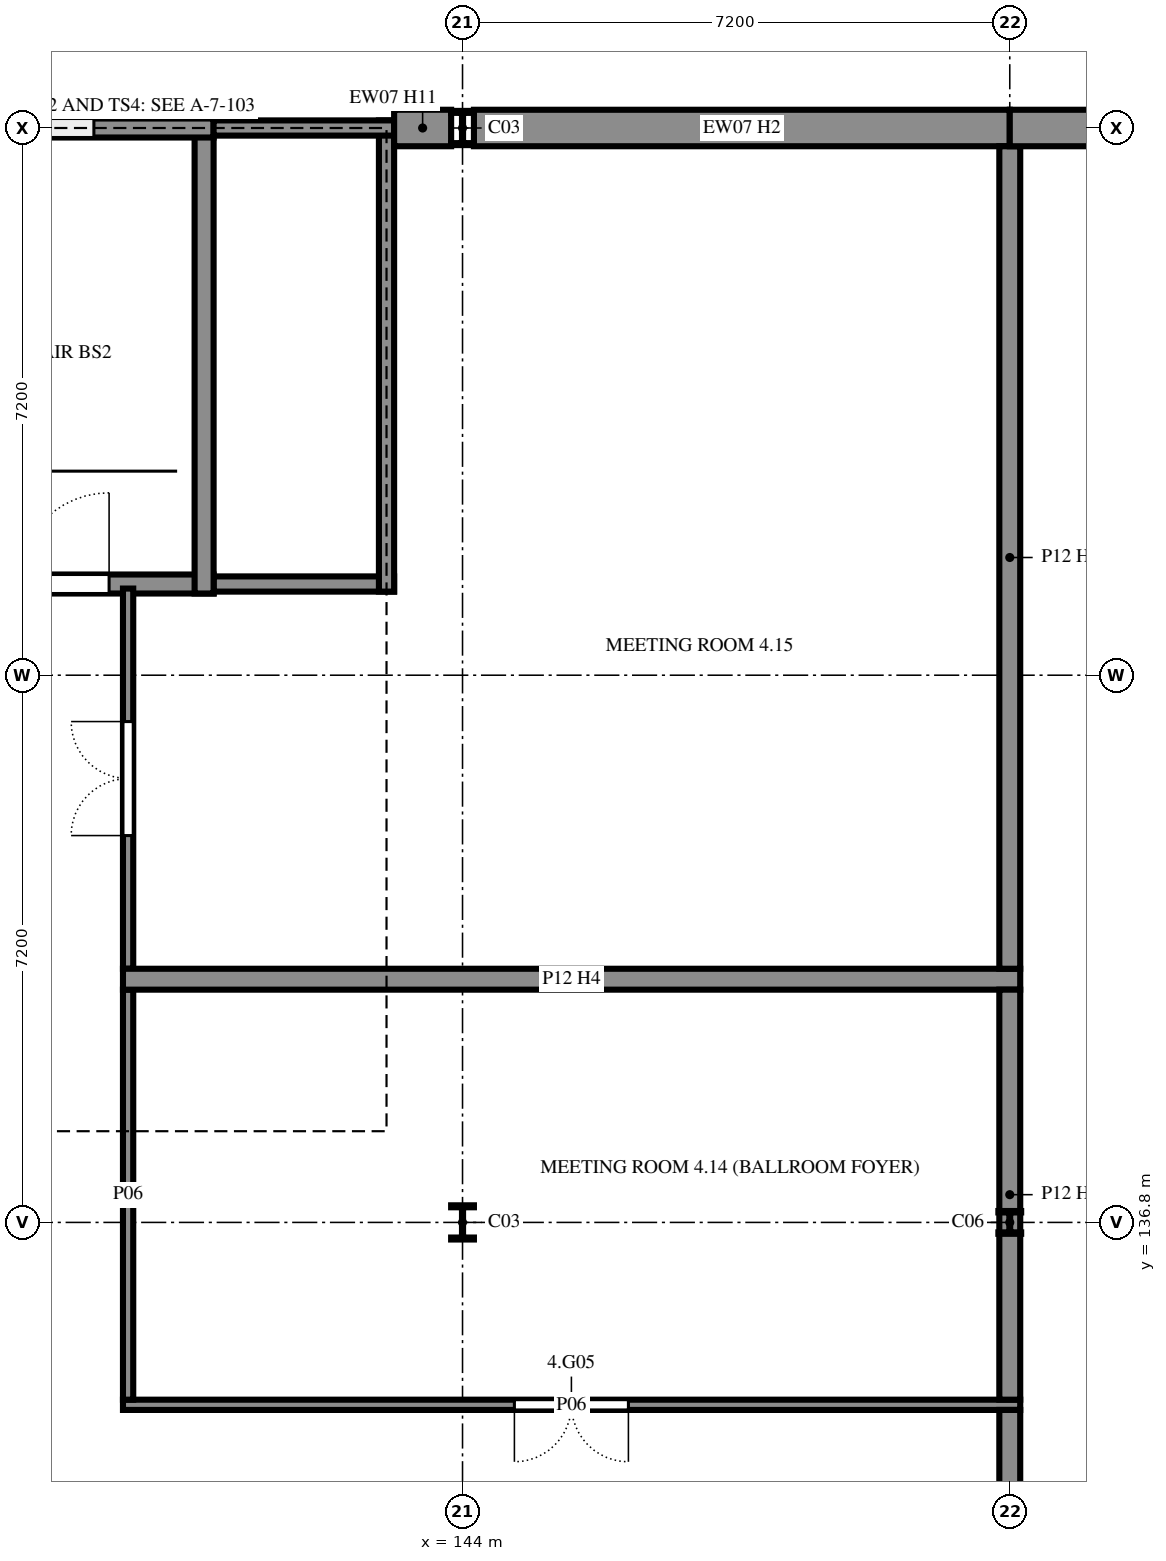
"""IFC4 building model, lengths in metres.
Left out: names, types, materials, properties, quantities, classifications, styles, units other than length and angle.
Written with IfcOpenShell. Run it as: python <this file> out.ifc"""

import sys

from ifc_helpers import new_model, si_unit, direction, frame, frame_2d, origin, origin_2d, place, context, subcontext, project, spatial, rectangle, i_section, extrude, element, fill, save


model = new_model("IFC4")
c1 = context("Model", 3, precision=1e-05, world=origin(), true_north=direction((0.0, 1.0)))
c2 = subcontext(c1, "Body", "Model", "MODEL_VIEW")
j1 = project(units=[si_unit("LENGTHUNIT", "METRE"), si_unit("PLANEANGLEUNIT", "RADIAN")], contexts=[c1])
p1 = place(None, origin())
s1 = spatial("IfcSite", under=j1, at=p1, CompositionType="ELEMENT")
p2 = place(p1, origin())
s2 = spatial("IfcBuilding", under=s1, at=p2, CompositionType="ELEMENT")
p3 = place(p2, frame((0.0, 0.0, 14.4)))
s3 = spatial("IfcBuildingStorey", under=s2, at=p3, CompositionType="ELEMENT", Elevation=14.4)
p4 = place(p3, frame((151.2, 136.8, 0.0), z_axis=(0.0, 0.0, 1.0), x_axis=(1.0, 0.0, 0.0)))
e1 = element("IfcColumn", 1, at=p4, inside=s3, PredefinedType="COLUMN", context=c2, shape_type="SweptSolid", body=[
    extrude(i_section(OverallWidth=0.3, OverallDepth=0.3, WebThickness=0.011, FlangeThickness=0.019, FilletRadius=0.027, at=origin_2d()), origin(), (0.0, 0.0, 1.0), 3.6),
])
for number, where, z_axis, x_axis in (
    (2, (144.0, 136.8, 0.0), (0.0, 0.0, 1.0), (1.0, 0.0, 0.0)),
    (3, (144.0, 151.2, 0.0), (0.0, 0.0, 1.0), (1.0, 0.0, 0.0)),
):
    element("IfcColumn", number, at=place(p3, frame(where, z_axis=z_axis, x_axis=x_axis)), inside=s3, PredefinedType="COLUMN", context=c2, shape_type="SweptSolid", body=[
        extrude(i_section(OverallWidth=0.3, OverallDepth=0.45, WebThickness=0.014, FlangeThickness=0.026, FilletRadius=0.027, at=origin_2d()), origin(), (0.0, 0.0, 1.0), 3.6),
    ])
p5 = place(p3, frame((136.675, 145.2, 0.0), z_axis=(0.0, 0.0, 1.0), x_axis=(1.0, 0.0, 0.0)))
e4 = element("IfcWall", 4, at=p5, inside=s3, PredefinedType="SHEAR", context=c2, shape_type="SweptSolid", body=[
    extrude(rectangle(XDim=4.05, YDim=0.25, at=frame_2d((2.025, 0.0))), origin(), (0.0, 0.0, 1.0), 3.6),
])
p6 = place(p5, frame((1.475, 0.0, 0.0)))
e5 = element("IfcOpeningElement", 5, at=p6, cuts=e4, PredefinedType="OPENING", context=c2, shape_type="SweptSolid", body=[
    extrude(rectangle(XDim=1.2, YDim=2.4, at=frame_2d((0.6, 1.2))), frame((0.0, 0.135, 0.0), z_axis=(0.0, -1.0, 0.0), x_axis=(1.0, 0.0, 0.0)), (0.0, 0.0, 1.0), 0.27),
])
p7 = place(p3, frame((140.725, 145.2, 0.0), z_axis=(0.0, 0.0, 1.0), x_axis=(1.0, 0.0, 0.0)))
e6 = element("IfcWall", 6, at=p7, inside=s3, PredefinedType="SHEAR", context=c2, shape_type="SweptSolid", body=[
    extrude(rectangle(XDim=2.375, YDim=0.2, at=frame_2d((1.188, 0.0))), origin(), (0.0, 0.0, 1.0), 3.6),
])
p8 = place(p3, frame((140.6, 145.075, 0.0), z_axis=(0.0, 0.0, 1.0), x_axis=(0.0, 1.0, 0.0)))
e7 = element("IfcWall", 7, at=p8, inside=s3, PredefinedType="SHEAR", context=c2, shape_type="SweptSolid", body=[
    extrude(rectangle(XDim=6.25, YDim=0.25, at=frame_2d((3.125, 0.0))), origin(), (0.0, 0.0, 1.0), 3.6),
])
p9 = place(p3, frame((143.0, 145.1, 0.0), z_axis=(0.0, 0.0, 1.0), x_axis=(0.0, 1.0, 0.0)))
e8 = element("IfcWall", 8, at=p9, inside=s3, PredefinedType="SHEAR", context=c2, shape_type="SweptSolid", body=[
    extrude(rectangle(XDim=6.2, YDim=0.2, at=frame_2d((3.1, 0.0))), origin(), (0.0, 0.0, 1.0), 3.6),
])
p10 = place(p3, frame((140.725, 151.2, 0.0), z_axis=(0.0, 0.0, 1.0), x_axis=(-1.0, 0.0, 0.0)))
e9 = element("IfcWall", 9, at=p10, inside=s3, PredefinedType="SHEAR", context=c2, shape_type="SweptSolid", body=[
    extrude(rectangle(XDim=4.05, YDim=0.25, at=frame_2d((2.025, 0.0))), origin(), (0.0, 0.0, 1.0), 3.6),
])
p11 = place(p10, frame((1.575, 0.0, 0.6)))
e10 = element("IfcOpeningElement", 10, at=p11, cuts=e9, PredefinedType="OPENING", context=c2, shape_type="SweptSolid", body=[
    extrude(rectangle(XDim=0.9, YDim=2.1, at=frame_2d((0.45, 1.05))), frame((0.0, 0.135, 0.0), z_axis=(0.0, -1.0, 0.0), x_axis=(1.0, 0.0, 0.0)), (0.0, 0.0, 1.0), 0.27),
])
p12 = place(p3, frame((143.1, 151.2, 0.0), z_axis=(0.0, 0.0, 1.0), x_axis=(-1.0, 0.0, 0.0)))
e11 = element("IfcWall", 11, at=p12, inside=s3, PredefinedType="SHEAR", context=c2, shape_type="SweptSolid", body=[
    extrude(rectangle(XDim=2.375, YDim=0.2, at=frame_2d((1.188, 0.0))), origin(), (0.0, 0.0, 1.0), 3.6),
])
p13 = place(p3, frame((151.2, 151.2, 0.0), z_axis=(0.0, 0.0, 1.0), x_axis=(-1.0, 0.0, 0.0)))
e12 = element("IfcWall", 12, at=p13, inside=s3, PredefinedType="SOLIDWALL", context=c2, shape_type="SweptSolid", body=[
    extrude(rectangle(XDim=7.05, YDim=0.48, at=frame_2d((3.525, 0.0))), origin(), (0.0, 0.0, 1.0), 3.12),
])
p14 = place(p3, frame((143.85, 151.2, 0.0), z_axis=(0.0, 0.0, 1.0), x_axis=(-1.0, 0.0, 0.0)))
e13 = element("IfcWall", 13, at=p14, inside=s3, PredefinedType="SOLIDWALL", context=c2, shape_type="SweptSolid", body=[
    extrude(rectangle(XDim=0.75, YDim=0.48, at=frame_2d((0.375, 0.0))), origin(), (0.0, 0.0, 1.0), 3.22),
])
p15 = place(p3, frame((139.532, 134.4, 0.0), z_axis=(0.0, 0.0, 1.0), x_axis=(1.0, 0.0, 0.0)))
e14 = element("IfcWall", 14, at=p15, inside=s3, PredefinedType="PARTITIONING", context=c2, shape_type="SweptSolid", body=[
    extrude(rectangle(XDim=11.805, YDim=0.135, at=frame_2d((5.902, 0.0))), origin(), (0.0, 0.0, 1.0), 3.42),
])
p16 = place(p15, frame((5.15, 0.0, 0.0)))
e15 = element("IfcOpeningElement", 15, at=p16, cuts=e14, PredefinedType="OPENING", context=c2, shape_type="SweptSolid", body=[
    extrude(rectangle(XDim=1.5, YDim=2.1, at=frame_2d((0.75, 1.05))), frame((0.0, 0.077, 0.0), z_axis=(0.0, -1.0, 0.0), x_axis=(1.0, 0.0, 0.0)), (0.0, 0.0, 1.0), 0.155),
])
p17 = place(p3, frame((151.2, 134.333, 0.0), z_axis=(0.0, 0.0, 1.0), x_axis=(0.0, -1.0, 0.0)))
e16 = element("IfcWall", 16, at=p17, inside=s3, PredefinedType="PARTITIONING", context=c2, shape_type="SweptSolid", body=[
    extrude(rectangle(XDim=2.772, YDim=0.275, at=frame_2d((1.386, 0.0))), origin(), (0.0, 0.0, 1.0), 3.6),
])
p18 = place(p3, frame((139.6, 139.863, 0.0), z_axis=(0.0, 0.0, 1.0), x_axis=(0.0, -1.0, 0.0)))
e17 = element("IfcWall", 17, at=p18, inside=s3, PredefinedType="PARTITIONING", context=c2, shape_type="SweptSolid", body=[
    extrude(rectangle(XDim=5.395, YDim=0.135, at=frame_2d((2.698, 0.0))), origin(), (0.0, 0.0, 1.0), 3.42),
])
p19 = place(p3, frame((139.6, 145.14, 0.0), z_axis=(0.0, 0.0, 1.0), x_axis=(0.0, -1.0, 0.0)))
e18 = element("IfcWall", 18, at=p19, inside=s3, PredefinedType="PARTITIONING", context=c2, shape_type="SweptSolid", body=[
    extrude(rectangle(XDim=5.002, YDim=0.135, at=frame_2d((2.501, 0.0))), origin(), (0.0, 0.0, 1.0), 3.42),
])
p20 = place(p19, frame((1.75, 0.0, 0.0)))
e19 = element("IfcOpeningElement", 19, at=p20, cuts=e18, PredefinedType="OPENING", context=c2, shape_type="SweptSolid", body=[
    extrude(rectangle(XDim=1.5, YDim=2.1, at=frame_2d((0.75, 1.05))), frame((0.0, 0.077, 0.0), z_axis=(0.0, -1.0, 0.0), x_axis=(1.0, 0.0, 0.0)), (0.0, 0.0, 1.0), 0.155),
])
p21 = place(p3, frame((139.532, 140.0, 0.0), z_axis=(0.0, 0.0, 1.0), x_axis=(1.0, 0.0, 0.0)))
e20 = element("IfcWall", 20, at=p21, inside=s3, PredefinedType="PARTITIONING", context=c2, shape_type="SweptSolid", body=[
    extrude(rectangle(XDim=11.805, YDim=0.275, at=frame_2d((5.902, 0.0))), origin(), (0.0, 0.0, 1.0), 3.42),
])
p22 = place(p3, frame((151.2, 139.863, 0.0), z_axis=(0.0, 0.0, 1.0), x_axis=(0.0, -1.0, 0.0)))
e21 = element("IfcWall", 21, at=p22, inside=s3, PredefinedType="PARTITIONING", context=c2, shape_type="SweptSolid", body=[
    extrude(rectangle(XDim=5.395, YDim=0.275, at=frame_2d((2.698, 0.0))), origin(), (0.0, 0.0, 1.0), 3.6),
])
p23 = place(p3, frame((151.2, 150.96, 0.0), z_axis=(0.0, 0.0, 1.0), x_axis=(0.0, -1.0, 0.0)))
e22 = element("IfcWall", 22, at=p23, inside=s3, PredefinedType="PARTITIONING", context=c2, shape_type="SweptSolid", body=[
    extrude(rectangle(XDim=10.823, YDim=0.275, at=frame_2d((5.411, 0.0))), origin(), (0.0, 0.0, 1.0), 3.6),
])
p24 = place(p3, frame((201.49, 151.2, 0.0), z_axis=(0.0, 0.0, 1.0), x_axis=(-1.0, 0.0, 0.0)))
e23 = element("IfcWall", 23, at=p24, inside=s3, PredefinedType="SOLIDWALL", context=c2, shape_type="SweptSolid", body=[
    extrude(rectangle(XDim=50.29, YDim=0.48, at=frame_2d((25.145, 0.0))), origin(), (0.0, 0.0, 1.0), 3.009),
])
p25 = place(p11, origin())
e24 = element("IfcWindow", 24, at=p25, inside=s3, PartitioningType="SINGLE_PANEL", PredefinedType="WINDOW", context=c2, shape_type="SweptSolid", body=[
    extrude(rectangle(XDim=0.9, YDim=2.1, at=frame_2d((0.45, 1.05))), frame((0.0, 0.03, 0.0), z_axis=(0.0, -1.0, 0.0), x_axis=(1.0, 0.0, 0.0)), (0.0, 0.0, 1.0), 0.06),
])
fill(e10, e24)
p26 = place(p6, origin())
e25 = element("IfcDoor", 25, at=p26, inside=s3, OperationType="SINGLE_SWING_LEFT", PredefinedType="DOOR", context=c2, shape_type="SweptSolid", body=[
    extrude(rectangle(XDim=1.2, YDim=2.4, at=frame_2d((0.6, 1.2))), frame((0.0, 0.025, 0.0), z_axis=(0.0, -1.0, 0.0), x_axis=(1.0, 0.0, 0.0)), (0.0, 0.0, 1.0), 0.05),
])
fill(e5, e25)
p27 = place(p16, frame((1.5, 0.0, 0.0), z_axis=(0.0, 0.0, 1.0), x_axis=(-1.0, 0.0, 0.0)))
e26 = element("IfcDoor", 26, at=p27, inside=s3, OperationType="DOUBLE_DOOR_SINGLE_SWING", PredefinedType="DOOR", context=c2, shape_type="SweptSolid", body=[
    extrude(rectangle(XDim=1.5, YDim=2.1, at=frame_2d((0.75, 1.05))), frame((0.0, 0.025, 0.0), z_axis=(0.0, -1.0, 0.0), x_axis=(1.0, 0.0, 0.0)), (0.0, 0.0, 1.0), 0.05),
])
fill(e15, e26)
p28 = place(p20, frame((1.5, 0.0, 0.0), z_axis=(0.0, 0.0, 1.0), x_axis=(-1.0, 0.0, 0.0)))
e27 = element("IfcDoor", 27, at=p28, inside=s3, OperationType="DOUBLE_DOOR_SINGLE_SWING", PredefinedType="DOOR", context=c2, shape_type="SweptSolid", body=[
    extrude(rectangle(XDim=1.5, YDim=2.1, at=frame_2d((0.75, 1.05))), frame((0.0, 0.025, 0.0), z_axis=(0.0, -1.0, 0.0), x_axis=(1.0, 0.0, 0.0)), (0.0, 0.0, 1.0), 0.05),
])
fill(e19, e27)
save(model, sys.argv[1])
